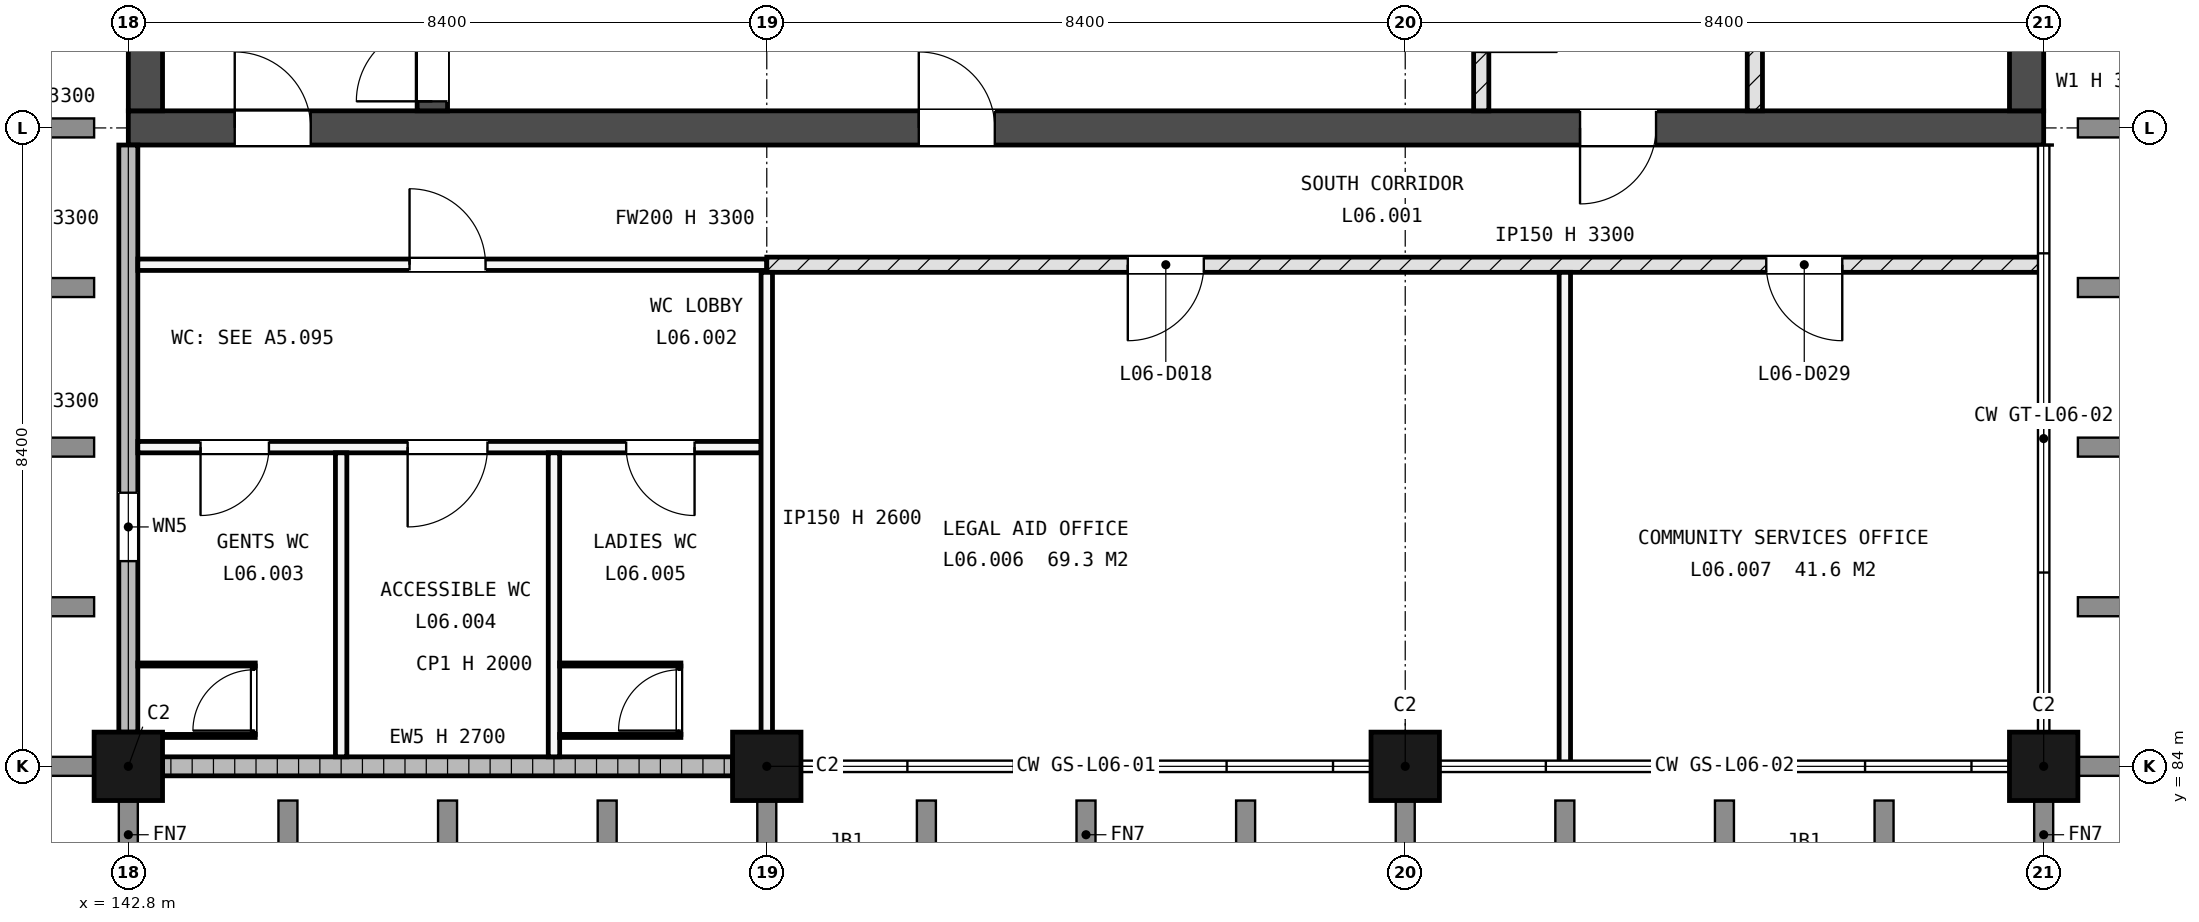
"""IFC4 building model, lengths in metres.
Left out: names, types, materials, properties, quantities, classifications, styles, units other than length and angle.
Written with IfcOpenShell. Run it as: python <this file> out.ifc"""

import sys

from ifc_helpers import new_model, si_unit, direction, frame, frame_2d, origin, origin_2d, place, context, subcontext, project, spatial, rectangle, extrude, element, fill, save


model = new_model("IFC4")
c1 = context("Model", 3, precision=1e-05, world=origin(), true_north=direction((0.0, 1.0)))
c2 = subcontext(c1, "Body", "Model", "MODEL_VIEW")
j1 = project(units=[si_unit("LENGTHUNIT", "METRE"), si_unit("PLANEANGLEUNIT", "RADIAN")], contexts=[c1])
p1 = place(None, origin())
s1 = spatial("IfcSite", under=j1, at=p1, CompositionType="ELEMENT")
p2 = place(p1, origin())
s2 = spatial("IfcBuilding", under=s1, at=p2, CompositionType="ELEMENT")
p3 = place(p2, frame((0.0, 0.0, 25.2)))
s3 = spatial("IfcBuildingStorey", under=s2, at=p3, CompositionType="ELEMENT", Elevation=25.2)
for number, where, z_axis, x_axis in (
    (1, (142.8, 84.0, -0.25), (0.0, 0.0, 1.0), (1.0, 0.0, 0.0)),
    (2, (151.2, 84.0, -0.25), (0.0, 0.0, 1.0), (1.0, 0.0, 0.0)),
    (3, (159.6, 84.0, -0.25), (0.0, 0.0, 1.0), (1.0, 0.0, 0.0)),
    (4, (168.0, 84.0, -0.25), (0.0, 0.0, 1.0), (1.0, 0.0, 0.0)),
):
    element("IfcColumn", number, at=place(p3, frame(where, z_axis=z_axis, x_axis=x_axis)), inside=s3, PredefinedType="COLUMN", context=c2, shape_type="SweptSolid", body=[
        extrude(rectangle(XDim=0.9, YDim=0.9, at=origin_2d()), origin(), (0.0, 0.0, 1.0), 3.6),
    ])
p4 = place(p3, frame((142.8, 92.4, -0.25), z_axis=(0.0, 0.0, 1.0), x_axis=(1.0, 0.0, 0.0)))
e5 = element("IfcWall", 5, at=p4, inside=s3, PredefinedType="SHEAR", context=c2, shape_type="SweptSolid", body=[
    extrude(rectangle(XDim=25.2, YDim=0.45, at=frame_2d((12.6, 0.0))), origin(), (0.0, 0.0, 1.0), 3.6),
])
p5 = place(p4, frame((1.4, 0.0, 0.25)))
e6 = element("IfcOpeningElement", 6, at=p5, cuts=e5, PredefinedType="OPENING", context=c2, shape_type="SweptSolid", body=[
    extrude(rectangle(XDim=1.0, YDim=2.1, at=frame_2d((0.5, 1.05))), frame((0.0, 0.235, 0.0), z_axis=(0.0, -1.0, 0.0), x_axis=(1.0, 0.0, 0.0)), (0.0, 0.0, 1.0), 0.47),
])
p6 = place(p4, frame((19.1, 0.0, 0.25)))
e7 = element("IfcOpeningElement", 7, at=p6, cuts=e5, PredefinedType="OPENING", context=c2, shape_type="SweptSolid", body=[
    extrude(rectangle(XDim=1.0, YDim=2.1, at=frame_2d((0.5, 1.05))), frame((0.0, 0.235, 0.0), z_axis=(0.0, -1.0, 0.0), x_axis=(1.0, 0.0, 0.0)), (0.0, 0.0, 1.0), 0.47),
])
p7 = place(p4, frame((10.4, 0.0, 0.25)))
e8 = element("IfcOpeningElement", 8, at=p7, cuts=e5, PredefinedType="OPENING", context=c2, shape_type="SweptSolid", body=[
    extrude(rectangle(XDim=1.0, YDim=2.1, at=frame_2d((0.5, 1.05))), frame((0.0, 0.235, 0.0), z_axis=(0.0, -1.0, 0.0), x_axis=(1.0, 0.0, 0.0)), (0.0, 0.0, 1.0), 0.47),
])
p8 = place(p3, frame((143.025, 92.625, -0.25), z_axis=(0.0, 0.0, 1.0), x_axis=(0.0, 1.0, 0.0)))
e9 = element("IfcWall", 9, at=p8, inside=s3, PredefinedType="SHEAR", context=c2, shape_type="SweptSolid", body=[
    extrude(rectangle(XDim=16.35, YDim=0.45, at=frame_2d((8.175, 0.0))), origin(), (0.0, 0.0, 1.0), 3.6),
])
p9 = place(p8, frame((2.975, 0.0, 1.85)))
e10 = element("IfcOpeningElement", 10, at=p9, cuts=e9, PredefinedType="OPENING", context=c2, shape_type="SweptSolid", body=[
    extrude(rectangle(XDim=1.2, YDim=0.9, at=frame_2d((0.6, 0.45))), frame((0.0, 0.235, 0.0), z_axis=(0.0, -1.0, 0.0), x_axis=(1.0, 0.0, 0.0)), (0.0, 0.0, 1.0), 0.47),
])
p10 = place(p3, frame((167.775, 92.625, -0.25), z_axis=(0.0, 0.0, 1.0), x_axis=(0.0, 1.0, 0.0)))
e11 = element("IfcWall", 11, at=p10, inside=s3, PredefinedType="SHEAR", context=c2, shape_type="SweptSolid", body=[
    extrude(rectangle(XDim=16.35, YDim=0.45, at=frame_2d((8.175, 0.0))), origin(), (0.0, 0.0, 1.0), 3.6),
])
p11 = place(p10, frame((12.175, 0.0, 1.85)))
e12 = element("IfcOpeningElement", 12, at=p11, cuts=e11, PredefinedType="OPENING", context=c2, shape_type="SweptSolid", body=[
    extrude(rectangle(XDim=1.2, YDim=0.9, at=frame_2d((0.6, 0.45))), frame((0.0, 0.235, 0.0), z_axis=(0.0, -1.0, 0.0), x_axis=(1.0, 0.0, 0.0)), (0.0, 0.0, 1.0), 0.47),
])
p12 = place(p3, frame((146.8, 92.625, -0.25), z_axis=(0.0, 0.0, 1.0), x_axis=(0.0, 1.0, 0.0)))
e13 = element("IfcWall", 13, at=p12, inside=s3, PredefinedType="SHEAR", context=c2, shape_type="SweptSolid", body=[
    extrude(rectangle(XDim=7.5, YDim=0.4, at=frame_2d((3.75, 0.0))), origin(), (0.0, 0.0, 1.0), 3.6),
])
p13 = place(p12, frame((0.125, 0.0, 0.25)))
e14 = element("IfcOpeningElement", 14, at=p13, cuts=e13, PredefinedType="OPENING", context=c2, shape_type="SweptSolid", body=[
    extrude(rectangle(XDim=1.0, YDim=2.1, at=frame_2d((0.5, 1.05))), frame((0.0, 0.21, 0.0), z_axis=(0.0, -1.0, 0.0), x_axis=(1.0, 0.0, 0.0)), (0.0, 0.0, 1.0), 0.42),
])
p14 = place(p3, frame((143.25, 84.0, 0.0), z_axis=(0.0, 0.0, 1.0), x_axis=(1.0, 0.0, 0.0)))
e15 = element("IfcWall", 15, at=p14, inside=s3, PredefinedType="STANDARD", context=c2, shape_type="SweptSolid", body=[
    extrude(rectangle(XDim=7.5, YDim=0.25, at=frame_2d((3.75, 0.0))), origin(), (0.0, 0.0, 1.0), 2.7),
])
p15 = place(p3, frame((142.8, 84.45, 0.0), z_axis=(0.0, 0.0, 1.0), x_axis=(0.0, 1.0, 0.0)))
e16 = element("IfcWall", 16, at=p15, inside=s3, PredefinedType="STANDARD", context=c2, shape_type="SweptSolid", body=[
    extrude(rectangle(XDim=7.725, YDim=0.25, at=frame_2d((3.863, 0.0))), origin(), (0.0, 0.0, 1.0), 3.3),
])
p16 = place(p15, frame((2.25, 0.0, 2.1)))
e17 = element("IfcOpeningElement", 17, at=p16, cuts=e16, PredefinedType="OPENING", context=c2, shape_type="SweptSolid", body=[
    extrude(rectangle(XDim=0.9, YDim=0.6, at=frame_2d((0.45, 0.3))), frame((0.0, 0.135, 0.0), z_axis=(0.0, -1.0, 0.0), x_axis=(1.0, 0.0, 0.0)), (0.0, 0.0, 1.0), 0.27),
])
p17 = place(p3, frame((142.925, 88.2, 0.0), z_axis=(0.0, 0.0, 1.0), x_axis=(1.0, 0.0, 0.0)))
e18 = element("IfcWall", 18, at=p17, inside=s3, PredefinedType="PARTITIONING", context=c2, shape_type="SweptSolid", body=[
    extrude(rectangle(XDim=8.2, YDim=0.15, at=frame_2d((4.1, 0.0))), origin(), (0.0, 0.0, 1.0), 3.3),
])
p18 = place(p17, frame((0.825, 0.0, 0.0)))
e19 = element("IfcOpeningElement", 19, at=p18, cuts=e18, PredefinedType="OPENING", context=c2, shape_type="SweptSolid", body=[
    extrude(rectangle(XDim=0.9, YDim=2.1, at=frame_2d((0.45, 1.05))), frame((0.0, 0.085, 0.0), z_axis=(0.0, -1.0, 0.0), x_axis=(1.0, 0.0, 0.0)), (0.0, 0.0, 1.0), 0.17),
])
p19 = place(p17, frame((3.55, 0.0, 0.0)))
e20 = element("IfcOpeningElement", 20, at=p19, cuts=e18, PredefinedType="OPENING", context=c2, shape_type="SweptSolid", body=[
    extrude(rectangle(XDim=1.05, YDim=2.25, at=frame_2d((0.525, 1.125))), frame((0.0, 0.085, 0.0), z_axis=(0.0, -1.0, 0.0), x_axis=(1.0, 0.0, 0.0)), (0.0, 0.0, 1.0), 0.17),
])
p20 = place(p17, frame((6.425, 0.0, 0.0)))
e21 = element("IfcOpeningElement", 21, at=p20, cuts=e18, PredefinedType="OPENING", context=c2, shape_type="SweptSolid", body=[
    extrude(rectangle(XDim=0.9, YDim=2.1, at=frame_2d((0.45, 1.05))), frame((0.0, 0.085, 0.0), z_axis=(0.0, -1.0, 0.0), x_axis=(1.0, 0.0, 0.0)), (0.0, 0.0, 1.0), 0.17),
])
p21 = place(p3, frame((142.925, 90.6, 0.0), z_axis=(0.0, 0.0, 1.0), x_axis=(1.0, 0.0, 0.0)))
e22 = element("IfcWall", 22, at=p21, inside=s3, PredefinedType="PARTITIONING", context=c2, shape_type="SweptSolid", body=[
    extrude(rectangle(XDim=8.275, YDim=0.15, at=frame_2d((4.137, 0.0))), origin(), (0.0, 0.0, 1.0), 3.3),
])
p22 = place(p21, frame((3.575, 0.0, 0.0)))
e23 = element("IfcOpeningElement", 23, at=p22, cuts=e22, PredefinedType="OPENING", context=c2, shape_type="SweptSolid", body=[
    extrude(rectangle(XDim=1.0, YDim=2.1, at=frame_2d((0.5, 1.05))), frame((0.0, 0.085, 0.0), z_axis=(0.0, -1.0, 0.0), x_axis=(1.0, 0.0, 0.0)), (0.0, 0.0, 1.0), 0.17),
])
p23 = place(p3, frame((151.2, 90.6, 0.0), z_axis=(0.0, 0.0, 1.0), x_axis=(1.0, 0.0, 0.0)))
e24 = element("IfcWall", 24, at=p23, inside=s3, PredefinedType="SOLIDWALL", context=c2, shape_type="SweptSolid", body=[
    extrude(rectangle(XDim=16.8, YDim=0.2, at=frame_2d((8.4, 0.0))), origin(), (0.0, 0.0, 1.0), 3.3),
])
p24 = place(p23, frame((4.75, 0.0, 0.0)))
e25 = element("IfcOpeningElement", 25, at=p24, cuts=e24, PredefinedType="OPENING", context=c2, shape_type="SweptSolid", body=[
    extrude(rectangle(XDim=1.0, YDim=2.1, at=frame_2d((0.5, 1.05))), frame((0.0, 0.11, 0.0), z_axis=(0.0, -1.0, 0.0), x_axis=(1.0, 0.0, 0.0)), (0.0, 0.0, 1.0), 0.22),
])
p25 = place(p23, frame((13.15, 0.0, 0.0)))
e26 = element("IfcOpeningElement", 26, at=p25, cuts=e24, PredefinedType="OPENING", context=c2, shape_type="SweptSolid", body=[
    extrude(rectangle(XDim=1.0, YDim=2.1, at=frame_2d((0.5, 1.05))), frame((0.0, 0.11, 0.0), z_axis=(0.0, -1.0, 0.0), x_axis=(1.0, 0.0, 0.0)), (0.0, 0.0, 1.0), 0.22),
])
for number, where, z_axis, x_axis in (
    (27, (145.6, 84.125, 0.0), (0.0, 0.0, 1.0), (0.0, 1.0, 0.0)),
    (28, (148.4, 84.125, 0.0), (0.0, 0.0, 1.0), (0.0, 1.0, 0.0)),
):
    element("IfcWall", number, at=place(p3, frame(where, z_axis=z_axis, x_axis=x_axis)), inside=s3, PredefinedType="PARTITIONING", context=c2, shape_type="SweptSolid", body=[
        extrude(rectangle(XDim=4.0, YDim=0.15, at=frame_2d((2.0, 0.0))), origin(), (0.0, 0.0, 1.0), 3.3),
    ])
p26 = place(p3, frame((151.2, 84.0, 0.0), z_axis=(0.0, 0.0, 1.0), x_axis=(0.0, 1.0, 0.0)))
e29 = element("IfcWall", 29, at=p26, inside=s3, PredefinedType="PARTITIONING", context=c2, shape_type="SweptSolid", body=[
    extrude(rectangle(XDim=6.5, YDim=0.15, at=frame_2d((3.25, 0.0))), origin(), (0.0, 0.0, 1.0), 2.6),
])
p27 = place(p3, frame((160.6, 92.625, 0.0), z_axis=(0.0, 0.0, 1.0), x_axis=(0.0, 1.0, 0.0)))
e30 = element("IfcWall", 30, at=p27, inside=s3, PredefinedType="SOLIDWALL", context=c2, shape_type="SweptSolid", body=[
    extrude(rectangle(XDim=12.475, YDim=0.2, at=frame_2d((6.238, 0.0))), origin(), (0.0, 0.0, 1.0), 3.3),
])
p28 = place(p27, frame((5.075, 0.0, 0.0)))
e31 = element("IfcOpeningElement", 31, at=p28, cuts=e30, PredefinedType="OPENING", context=c2, shape_type="SweptSolid", body=[
    extrude(rectangle(XDim=0.8, YDim=2.1, at=frame_2d((0.4, 1.05))), frame((0.0, 0.11, 0.0), z_axis=(0.0, -1.0, 0.0), x_axis=(1.0, 0.0, 0.0)), (0.0, 0.0, 1.0), 0.22),
])
p29 = place(p27, frame((0.775, 0.0, 0.0)))
e32 = element("IfcOpeningElement", 32, at=p29, cuts=e30, PredefinedType="OPENING", context=c2, shape_type="SweptSolid", body=[
    extrude(rectangle(XDim=1.0, YDim=2.1, at=frame_2d((0.5, 1.05))), frame((0.0, 0.11, 0.0), z_axis=(0.0, -1.0, 0.0), x_axis=(1.0, 0.0, 0.0)), (0.0, 0.0, 1.0), 0.22),
])
p30 = place(p3, frame((161.7, 84.0, 0.0), z_axis=(0.0, 0.0, 1.0), x_axis=(0.0, 1.0, 0.0)))
e33 = element("IfcWall", 33, at=p30, inside=s3, PredefinedType="PARTITIONING", context=c2, shape_type="SweptSolid", body=[
    extrude(rectangle(XDim=6.5, YDim=0.15, at=frame_2d((3.25, 0.0))), origin(), (0.0, 0.0, 1.0), 3.3),
])
p31 = place(p3, frame((164.2, 92.625, 0.0), z_axis=(0.0, 0.0, 1.0), x_axis=(0.0, 1.0, 0.0)))
e34 = element("IfcWall", 34, at=p31, inside=s3, PredefinedType="SOLIDWALL", context=c2, shape_type="SweptSolid", body=[
    extrude(rectangle(XDim=8.725, YDim=0.2, at=frame_2d((4.363, 0.0))), origin(), (0.0, 0.0, 1.0), 3.3),
])
p32 = place(p31, frame((1.675, 0.0, 0.0)))
e35 = element("IfcOpeningElement", 35, at=p32, cuts=e34, PredefinedType="OPENING", context=c2, shape_type="SweptSolid", body=[
    extrude(rectangle(XDim=0.8, YDim=2.1, at=frame_2d((0.4, 1.05))), frame((0.0, 0.11, 0.0), z_axis=(0.0, -1.0, 0.0), x_axis=(1.0, 0.0, 0.0)), (0.0, 0.0, 1.0), 0.22),
])
p33 = place(p31, frame((6.275, 0.0, 0.0)))
e36 = element("IfcOpeningElement", 36, at=p33, cuts=e34, PredefinedType="OPENING", context=c2, shape_type="SweptSolid", body=[
    extrude(rectangle(XDim=0.8, YDim=2.1, at=frame_2d((0.4, 1.05))), frame((0.0, 0.11, 0.0), z_axis=(0.0, -1.0, 0.0), x_axis=(1.0, 0.0, 0.0)), (0.0, 0.0, 1.0), 0.22),
])
p34 = place(p3, frame((142.93, 84.4, 0.0), z_axis=(0.0, 0.0, 1.0), x_axis=(1.0, 0.0, 0.0)))
e37 = element("IfcWall", 37, at=p34, inside=s3, PredefinedType="PARTITIONING", context=c2, shape_type="SweptSolid", body=[
    extrude(rectangle(XDim=1.54, YDim=0.04, at=frame_2d((0.77, 0.0))), origin(), (0.0, 0.0, 1.0), 2.0),
])
p35 = place(p3, frame((142.925, 85.34, 0.0), z_axis=(0.0, 0.0, 1.0), x_axis=(1.0, 0.0, 0.0)))
e38 = element("IfcWall", 38, at=p35, inside=s3, PredefinedType="PARTITIONING", context=c2, shape_type="SweptSolid", body=[
    extrude(rectangle(XDim=1.545, YDim=0.04, at=frame_2d((0.772, 0.0))), origin(), (0.0, 0.0, 1.0), 2.0),
])
p36 = place(p3, frame((144.45, 84.42, 0.0), z_axis=(0.0, 0.0, 1.0), x_axis=(0.0, 1.0, 0.0)))
e39 = element("IfcWall", 39, at=p36, inside=s3, PredefinedType="PARTITIONING", context=c2, shape_type="SweptSolid", body=[
    extrude(rectangle(XDim=0.9, YDim=0.04, at=frame_2d((0.45, 0.0))), origin(), (0.0, 0.0, 1.0), 2.0),
])
p37 = place(p36, frame((0.05, 0.0, 0.0)))
e40 = element("IfcOpeningElement", 40, at=p37, cuts=e39, PredefinedType="OPENING", context=c2, shape_type="SweptSolid", body=[
    extrude(rectangle(XDim=0.8, YDim=2.0, at=frame_2d((0.4, 1.0))), frame((0.0, 0.03, 0.0), z_axis=(0.0, -1.0, 0.0), x_axis=(1.0, 0.0, 0.0)), (0.0, 0.0, 1.0), 0.06),
])
for number, where, z_axis, x_axis in (
    (41, (148.475, 84.4, 0.0), (0.0, 0.0, 1.0), (1.0, 0.0, 0.0)),
    (42, (148.475, 85.34, 0.0), (0.0, 0.0, 1.0), (1.0, 0.0, 0.0)),
):
    element("IfcWall", number, at=place(p3, frame(where, z_axis=z_axis, x_axis=x_axis)), inside=s3, PredefinedType="PARTITIONING", context=c2, shape_type="SweptSolid", body=[
        extrude(rectangle(XDim=1.595, YDim=0.04, at=frame_2d((0.797, 0.0))), origin(), (0.0, 0.0, 1.0), 2.0),
    ])
p38 = place(p3, frame((150.05, 84.42, 0.0), z_axis=(0.0, 0.0, 1.0), x_axis=(0.0, 1.0, 0.0)))
e43 = element("IfcWall", 43, at=p38, inside=s3, PredefinedType="PARTITIONING", context=c2, shape_type="SweptSolid", body=[
    extrude(rectangle(XDim=0.9, YDim=0.04, at=frame_2d((0.45, 0.0))), origin(), (0.0, 0.0, 1.0), 2.0),
])
p39 = place(p38, frame((0.05, 0.0, 0.0)))
e44 = element("IfcOpeningElement", 44, at=p39, cuts=e43, PredefinedType="OPENING", context=c2, shape_type="SweptSolid", body=[
    extrude(rectangle(XDim=0.8, YDim=2.0, at=frame_2d((0.4, 1.0))), frame((0.0, 0.03, 0.0), z_axis=(0.0, -1.0, 0.0), x_axis=(1.0, 0.0, 0.0)), (0.0, 0.0, 1.0), 0.06),
])
p40 = place(p16, origin())
e45 = element("IfcWindow", 45, at=p40, inside=s3, PartitioningType="SINGLE_PANEL", PredefinedType="WINDOW", context=c2, shape_type="SweptSolid", body=[
    extrude(rectangle(XDim=0.9, YDim=0.6, at=frame_2d((0.45, 0.3))), frame((0.0, 0.03, 0.0), z_axis=(0.0, -1.0, 0.0), x_axis=(1.0, 0.0, 0.0)), (0.0, 0.0, 1.0), 0.06),
])
fill(e17, e45)
p41 = place(p5, origin())
e46 = element("IfcDoor", 46, at=p41, inside=s3, OperationType="SINGLE_SWING_RIGHT", PredefinedType="DOOR", context=c2, shape_type="SweptSolid", body=[
    extrude(rectangle(XDim=1.0, YDim=2.1, at=frame_2d((0.5, 1.05))), frame((0.0, 0.025, 0.0), z_axis=(0.0, -1.0, 0.0), x_axis=(1.0, 0.0, 0.0)), (0.0, 0.0, 1.0), 0.05),
])
fill(e6, e46)
p42 = place(p13, origin())
e47 = element("IfcDoor", 47, at=p42, inside=s3, OperationType="SINGLE_SWING_RIGHT", PredefinedType="DOOR", context=c2, shape_type="SweptSolid", body=[
    extrude(rectangle(XDim=1.0, YDim=2.1, at=frame_2d((0.5, 1.05))), frame((0.0, 0.025, 0.0), z_axis=(0.0, -1.0, 0.0), x_axis=(1.0, 0.0, 0.0)), (0.0, 0.0, 1.0), 0.05),
])
fill(e14, e47)
p43 = place(p18, origin())
e48 = element("IfcDoor", 48, at=p43, inside=s3, OperationType="SINGLE_SWING_LEFT", PredefinedType="DOOR", context=c2, shape_type="SweptSolid", body=[
    extrude(rectangle(XDim=0.9, YDim=2.1, at=frame_2d((0.45, 1.05))), frame((0.0, 0.025, 0.0), z_axis=(0.0, -1.0, 0.0), x_axis=(1.0, 0.0, 0.0)), (0.0, 0.0, 1.0), 0.05),
])
fill(e19, e48)
p44 = place(p19, origin())
e49 = element("IfcDoor", 49, at=p44, inside=s3, OperationType="SINGLE_SWING_LEFT", PredefinedType="DOOR", context=c2, shape_type="SweptSolid", body=[
    extrude(rectangle(XDim=1.05, YDim=2.25, at=frame_2d((0.525, 1.125))), frame((0.0, 0.025, 0.0), z_axis=(0.0, -1.0, 0.0), x_axis=(1.0, 0.0, 0.0)), (0.0, 0.0, 1.0), 0.05),
])
fill(e20, e49)
p45 = place(p20, origin())
e50 = element("IfcDoor", 50, at=p45, inside=s3, OperationType="SINGLE_SWING_RIGHT", PredefinedType="DOOR", context=c2, shape_type="SweptSolid", body=[
    extrude(rectangle(XDim=0.9, YDim=2.1, at=frame_2d((0.45, 1.05))), frame((0.0, 0.025, 0.0), z_axis=(0.0, -1.0, 0.0), x_axis=(1.0, 0.0, 0.0)), (0.0, 0.0, 1.0), 0.05),
])
fill(e21, e50)
p46 = place(p24, origin())
e51 = element("IfcDoor", 51, at=p46, inside=s3, OperationType="SINGLE_SWING_LEFT", PredefinedType="DOOR", context=c2, shape_type="SweptSolid", body=[
    extrude(rectangle(XDim=1.0, YDim=2.1, at=frame_2d((0.5, 1.05))), frame((0.0, 0.025, 0.0), z_axis=(0.0, -1.0, 0.0), x_axis=(1.0, 0.0, 0.0)), (0.0, 0.0, 1.0), 0.05),
])
fill(e25, e51)
p47 = place(p25, origin())
e52 = element("IfcDoor", 52, at=p47, inside=s3, OperationType="SINGLE_SWING_RIGHT", PredefinedType="DOOR", context=c2, shape_type="SweptSolid", body=[
    extrude(rectangle(XDim=1.0, YDim=2.1, at=frame_2d((0.5, 1.05))), frame((0.0, 0.025, 0.0), z_axis=(0.0, -1.0, 0.0), x_axis=(1.0, 0.0, 0.0)), (0.0, 0.0, 1.0), 0.05),
])
fill(e26, e52)
p48 = place(p22, origin())
e53 = element("IfcDoor", 53, at=p48, inside=s3, OperationType="SINGLE_SWING_RIGHT", PredefinedType="DOOR", context=c2, shape_type="SweptSolid", body=[
    extrude(rectangle(XDim=1.0, YDim=2.1, at=frame_2d((0.5, 1.05))), frame((0.0, 0.025, 0.0), z_axis=(0.0, -1.0, 0.0), x_axis=(1.0, 0.0, 0.0)), (0.0, 0.0, 1.0), 0.05),
])
fill(e23, e53)
p49 = place(p6, origin())
e54 = element("IfcDoor", 54, at=p49, inside=s3, OperationType="SINGLE_SWING_LEFT", PredefinedType="DOOR", context=c2, shape_type="SweptSolid", body=[
    extrude(rectangle(XDim=1.0, YDim=2.1, at=frame_2d((0.5, 1.05))), frame((0.0, 0.025, 0.0), z_axis=(0.0, -1.0, 0.0), x_axis=(1.0, 0.0, 0.0)), (0.0, 0.0, 1.0), 0.05),
])
fill(e7, e54)
p50 = place(p7, origin())
e55 = element("IfcDoor", 55, at=p50, inside=s3, OperationType="SINGLE_SWING_RIGHT", PredefinedType="DOOR", context=c2, shape_type="SweptSolid", body=[
    extrude(rectangle(XDim=1.0, YDim=2.1, at=frame_2d((0.5, 1.05))), frame((0.0, 0.025, 0.0), z_axis=(0.0, -1.0, 0.0), x_axis=(1.0, 0.0, 0.0)), (0.0, 0.0, 1.0), 0.05),
])
fill(e8, e55)
p51 = place(p37, origin())
e56 = element("IfcDoor", 56, at=p51, inside=s3, OperationType="SINGLE_SWING_LEFT", PredefinedType="DOOR", context=c2, shape_type="SweptSolid", body=[
    extrude(rectangle(XDim=0.8, YDim=2.0, at=frame_2d((0.4, 1.0))), frame((0.0, 0.02, 0.0), z_axis=(0.0, -1.0, 0.0), x_axis=(1.0, 0.0, 0.0)), (0.0, 0.0, 1.0), 0.04),
])
fill(e40, e56)
p52 = place(p39, origin())
e57 = element("IfcDoor", 57, at=p52, inside=s3, OperationType="SINGLE_SWING_LEFT", PredefinedType="DOOR", context=c2, shape_type="SweptSolid", body=[
    extrude(rectangle(XDim=0.8, YDim=2.0, at=frame_2d((0.4, 1.0))), frame((0.0, 0.02, 0.0), z_axis=(0.0, -1.0, 0.0), x_axis=(1.0, 0.0, 0.0)), (0.0, 0.0, 1.0), 0.04),
])
fill(e44, e57)
save(model, sys.argv[1])
